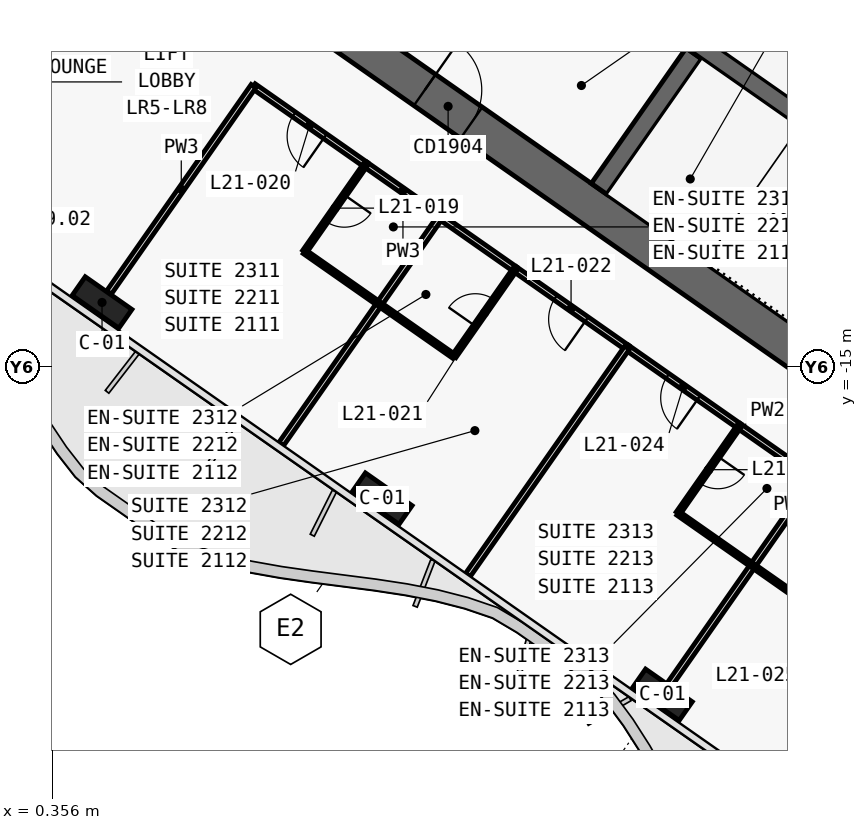
"""IFC4 building model, lengths in metres.
Left out: names, types, materials, properties, quantities, classifications, styles, units other than length and angle.
Written with IfcOpenShell. Run it as: python <this file> out.ifc"""

import sys

from ifc_helpers import new_model, si_unit, direction, frame, frame_2d, origin, origin_2d, place, context, subcontext, project, spatial, polyline, rectangle, outline, extrude, element, fill, save


model = new_model("IFC4")
c1 = context("Model", 3, precision=1e-05, world=origin(), true_north=direction((0.0, 1.0)))
c2 = subcontext(c1, "Body", "Model", "MODEL_VIEW")
j1 = project(units=[si_unit("LENGTHUNIT", "METRE"), si_unit("PLANEANGLEUNIT", "RADIAN")], contexts=[c1])
p1 = place(None, origin())
s1 = spatial("IfcSite", under=j1, at=p1, CompositionType="ELEMENT")
p2 = place(p1, origin())
s2 = spatial("IfcBuilding", under=s1, at=p2, CompositionType="ELEMENT")
p3 = place(p2, frame((0.0, 0.0, 101.3)))
s3 = spatial("IfcBuildingStorey", under=s2, at=p3, CompositionType="ELEMENT", Elevation=101.3)
p4 = place(p3, frame((-0.037, 11.867, 0.0), z_axis=(0.0, 0.0, 1.0), x_axis=(0.819155306259, -0.573571777746, 0.0)))
e1 = element("IfcWall", 1, at=p4, inside=s3, PredefinedType="SHEAR", context=c2, shape_type="SweptSolid", body=[
    extrude(outline(polyline([(33.837, 0.5), (0.0, 0.5), (0.7, -0.5), (33.837, -0.5), (33.837, 0.5)])), origin(), (0.0, 0.0, 1.0), 3.6),
])
p5 = place(p3, frame((-0.037, -0.585, 0.0), z_axis=(0.0, 0.0, 1.0), x_axis=(0.819157152511, -0.573569140985, 0.0)))
e2 = element("IfcWall", 2, at=p5, inside=s3, PredefinedType="SHEAR", context=c2, shape_type="SweptSolid", body=[
    extrude(outline(polyline([(26.695, 0.5), (0.0, 0.5), (0.7, -0.5), (26.695, -0.5), (26.695, 0.5)])), origin(), (0.0, 0.0, 1.0), 3.6),
])
p6 = place(p5, frame((1.045, 0.0, 0.0)))
e3 = element("IfcOpeningElement", 3, at=p6, cuts=e2, PredefinedType="OPENING", context=c2, shape_type="SweptSolid", body=[
    extrude(rectangle(XDim=1.5, YDim=2.1, at=frame_2d((0.75, 1.05))), frame((0.0, 0.51, 0.0), z_axis=(0.0, -1.0, 0.0), x_axis=(1.0, 0.0, 0.0)), (0.0, 0.0, 1.0), 1.02),
])
p7 = place(p5, frame((12.445, 0.0, 0.0)))
e4 = element("IfcOpeningElement", 4, at=p7, cuts=e2, PredefinedType="OPENING", context=c2, shape_type="SweptSolid", body=[
    extrude(rectangle(XDim=1.5, YDim=2.1, at=frame_2d((0.75, 1.05))), frame((0.0, 0.51, 0.0), z_axis=(0.0, -1.0, 0.0), x_axis=(1.0, 0.0, 0.0)), (0.0, 0.0, 1.0), 1.02),
])
p8 = place(p3, frame((14.745, -10.324, 0.0), z_axis=(0.0, 0.0, 1.0), x_axis=(0.57356780395, 0.819158088694, 0.0)))
e5 = element("IfcWall", 5, at=p8, inside=s3, PredefinedType="SHEAR", context=c2, shape_type="SweptSolid", body=[
    extrude(outline(polyline([(0.0, 0.25), (0.0, -0.25), (4.35, -0.25), (4.35, 0.25), (0.0, 0.25)])), origin(), (0.0, 0.0, 1.0), 3.6),
])
p9 = place(p3, frame((2.638, 3.768, 0.0), z_axis=(0.0, 0.0, 1.0), x_axis=(0.819148977158, -0.573580816643, 0.0)))
e6 = element("IfcWall", 6, at=p9, inside=s3, PredefinedType="SHEAR", context=c2, shape_type="SweptSolid", body=[
    extrude(outline(polyline([(0.0, 0.25), (0.0, -0.25), (26.0, -0.25), (26.0, 0.25), (0.0, 0.25)])), origin(), (0.0, 0.0, 1.0), 3.6),
])
p10 = place(p9, frame((9.637, 0.0, 0.0)))
e7 = element("IfcOpeningElement", 7, at=p10, cuts=e6, PredefinedType="OPENING", context=c2, shape_type="SweptSolid", body=[
    extrude(rectangle(XDim=1.2, YDim=2.1, at=frame_2d((0.6, 1.05))), frame((0.0, 0.26, 0.0), z_axis=(0.0, -1.0, 0.0), x_axis=(1.0, 0.0, 0.0)), (0.0, 0.0, 1.0), 0.52),
])
p11 = place(p9, frame((11.812, 0.0, 0.0)))
e8 = element("IfcOpeningElement", 8, at=p11, cuts=e6, PredefinedType="OPENING", context=c2, shape_type="SweptSolid", body=[
    extrude(rectangle(XDim=1.2, YDim=2.1, at=frame_2d((0.6, 1.05))), frame((0.0, 0.26, 0.0), z_axis=(0.0, -1.0, 0.0), x_axis=(1.0, 0.0, 0.0)), (0.0, 0.0, 1.0), 0.52),
])
p12 = place(p9, frame((13.988, 0.0, 0.0)))
e9 = element("IfcOpeningElement", 9, at=p12, cuts=e6, PredefinedType="OPENING", context=c2, shape_type="SweptSolid", body=[
    extrude(rectangle(XDim=1.2, YDim=2.1, at=frame_2d((0.6, 1.05))), frame((0.0, 0.26, 0.0), z_axis=(0.0, -1.0, 0.0), x_axis=(1.0, 0.0, 0.0)), (0.0, 0.0, 1.0), 0.52),
])
p13 = place(p9, frame((16.262, 0.0, 0.0)))
e10 = element("IfcOpeningElement", 10, at=p13, cuts=e6, PredefinedType="OPENING", context=c2, shape_type="SweptSolid", body=[
    extrude(rectangle(XDim=1.0, YDim=2.1, at=frame_2d((0.5, 1.05))), frame((0.0, 0.26, 0.0), z_axis=(0.0, -1.0, 0.0), x_axis=(1.0, 0.0, 0.0)), (0.0, 0.0, 1.0), 0.52),
])
for number, where, z_axis, x_axis in (
    (11, (1.665, -13.313, 0.0), (0.0, 0.0, 1.0), (0.819, -0.574, 0.0)),
    (12, (9.038, -18.475, 0.0), (0.0, 0.0, 1.0), (0.819, -0.574, 0.0)),
    (13, (16.41, -23.637, 0.0), (0.0, 0.0, 1.0), (0.819, -0.574, 0.0)),
):
    element("IfcColumn", number, at=place(p3, frame(where, z_axis=z_axis, x_axis=x_axis)), inside=s3, PredefinedType="COLUMN", context=c2, shape_type="SweptSolid", body=[
        extrude(rectangle(XDim=1.5, YDim=0.6, at=origin_2d()), origin(), (0.0, 0.0, 1.0), 3.6),
    ])
p14 = place(p3, frame((8.601, -9.685, 0.0), z_axis=(0.0, 0.0, 1.0), x_axis=(-0.819149096931, 0.573580645591, 0.0)))
e14 = element("IfcWall", 14, at=p14, inside=s3, PredefinedType="PARTITIONING", context=c2, shape_type="SweptSolid", body=[
    extrude(rectangle(XDim=3.601, YDim=0.15, at=frame_2d((1.8, 0.0))), origin(), (0.0, 0.0, 1.0), 2.6),
])
p15 = place(p14, frame((1.301, 0.0, 0.0)))
e15 = element("IfcOpeningElement", 15, at=p15, cuts=e14, PredefinedType="OPENING", context=c2, shape_type="SweptSolid", body=[
    extrude(rectangle(XDim=1.0, YDim=2.1, at=frame_2d((0.5, 1.05))), frame((0.0, 0.085, 0.0), z_axis=(0.0, -1.0, 0.0), x_axis=(1.0, 0.0, 0.0)), (0.0, 0.0, 1.0), 0.17),
])
p16 = place(p3, frame((10.568, -11.062, 0.0), z_axis=(0.0, 0.0, 1.0), x_axis=(-0.819146032251, 0.573585022335, 0.0)))
e16 = element("IfcWall", 16, at=p16, inside=s3, PredefinedType="PARTITIONING", context=c2, shape_type="SweptSolid", body=[
    extrude(rectangle(XDim=2.404, YDim=0.15, at=frame_2d((1.202, 0.0))), origin(), (0.0, 0.0, 1.0), 3.32),
])
p17 = place(p3, frame((15.483, -14.504, 0.0), z_axis=(0.0, 0.0, 1.0), x_axis=(-0.819145961204, 0.573585123798, 0.0)))
e17 = element("IfcWall", 17, at=p17, inside=s3, PredefinedType="PARTITIONING", context=c2, shape_type="SweptSolid", body=[
    extrude(rectangle(XDim=3.603, YDim=0.15, at=frame_2d((1.802, 0.0))), origin(), (0.0, 0.0, 1.0), 2.6),
])
p18 = place(p17, frame((1.302, 0.0, 0.0)))
e18 = element("IfcOpeningElement", 18, at=p18, cuts=e17, PredefinedType="OPENING", context=c2, shape_type="SweptSolid", body=[
    extrude(rectangle(XDim=1.0, YDim=2.1, at=frame_2d((0.5, 1.05))), frame((0.0, 0.085, 0.0), z_axis=(0.0, -1.0, 0.0), x_axis=(1.0, 0.0, 0.0)), (0.0, 0.0, 1.0), 0.17),
])
p19 = place(p3, frame((12.534, -12.439, 0.0), z_axis=(0.0, 0.0, 1.0), x_axis=(-0.819193748, 0.57351687267, 0.0)))
e19 = element("IfcWall", 19, at=p19, inside=s3, PredefinedType="PARTITIONING", context=c2, shape_type="SweptSolid", body=[
    extrude(rectangle(XDim=2.404, YDim=0.15, at=frame_2d((1.202, 0.0))), origin(), (0.0, 0.0, 1.0), 3.32),
])
p20 = place(p3, frame((18.431, -16.568, 0.0), z_axis=(0.0, 0.0, 1.0), x_axis=(-0.819145961204, 0.573585123798, 0.0)))
e20 = element("IfcWall", 20, at=p20, inside=s3, PredefinedType="PARTITIONING", context=c2, shape_type="SweptSolid", body=[
    extrude(rectangle(XDim=3.603, YDim=0.15, at=frame_2d((1.802, 0.0))), origin(), (0.0, 0.0, 1.0), 3.32),
])
p21 = place(p20, frame((1.301, 0.0, 0.0)))
e21 = element("IfcOpeningElement", 21, at=p21, cuts=e20, PredefinedType="OPENING", context=c2, shape_type="SweptSolid", body=[
    extrude(rectangle(XDim=1.0, YDim=2.1, at=frame_2d((0.5, 1.05))), frame((0.0, 0.085, 0.0), z_axis=(0.0, -1.0, 0.0), x_axis=(1.0, 0.0, 0.0)), (0.0, 0.0, 1.0), 0.17),
])
p22 = place(p3, frame((20.398, -17.945, 0.0), z_axis=(0.0, 0.0, 1.0), x_axis=(-0.819146032251, 0.573585022335, 0.0)))
e22 = element("IfcWall", 22, at=p22, inside=s3, PredefinedType="PARTITIONING", context=c2, shape_type="SweptSolid", body=[
    extrude(rectangle(XDim=2.404, YDim=0.15, at=frame_2d((1.202, 0.0))), origin(), (0.0, 0.0, 1.0), 2.6),
])
p23 = place(p3, frame((8.6, -9.684, 0.0), z_axis=(0.0, 0.0, 1.0), x_axis=(-0.573550118428, -0.819170471667, 0.0)))
e23 = element("IfcWall", 23, at=p23, inside=s3, PredefinedType="PARTITIONING", context=c2, shape_type="SweptSolid", body=[
    extrude(rectangle(XDim=2.8, YDim=0.12, at=frame_2d((1.4, 0.0))), origin(), (0.0, 0.0, 1.0), 3.32),
])
p24 = place(p23, frame((0.975, 0.0, 0.0)))
e24 = element("IfcOpeningElement", 24, at=p24, cuts=e23, PredefinedType="OPENING", context=c2, shape_type="SweptSolid", body=[
    extrude(rectangle(XDim=0.85, YDim=2.05, at=frame_2d((0.425, 1.025))), frame((0.0, 0.07, 0.0), z_axis=(0.0, -1.0, 0.0), x_axis=(1.0, 0.0, 0.0)), (0.0, 0.0, 1.0), 0.14),
])
p25 = place(p3, frame((6.994, -11.979, 0.0), z_axis=(0.0, 0.0, 1.0), x_axis=(0.819188907105, -0.573523787192, 0.0)))
e25 = element("IfcWall", 25, at=p25, inside=s3, PredefinedType="PARTITIONING", context=c2, shape_type="SweptSolid", body=[
    extrude(rectangle(XDim=2.4, YDim=0.12, at=frame_2d((1.2, 0.0))), origin(), (0.0, 0.0, 1.0), 3.32),
])
p26 = place(p3, frame((8.96, -13.355, 0.0), z_axis=(0.0, 0.0, 1.0), x_axis=(-0.573564311442, -0.819160534108, 0.0)))
e26 = element("IfcWall", 26, at=p26, inside=s3, PredefinedType="PARTITIONING", context=c2, shape_type="SweptSolid", body=[
    extrude(rectangle(XDim=4.499, YDim=0.15, at=frame_2d((2.25, 0.0))), origin(), (0.0, 0.0, 1.0), 2.5),
])
p27 = place(p3, frame((1.849, -13.051, 0.0), z_axis=(0.0, 0.0, 1.0), x_axis=(0.57357355307, 0.819154063177, 0.0)))
e27 = element("IfcWall", 27, at=p27, inside=s3, PredefinedType="PARTITIONING", context=c2, shape_type="SweptSolid", body=[
    extrude(rectangle(XDim=6.63, YDim=0.15, at=frame_2d((3.315, 0.0))), origin(), (0.0, 0.0, 1.0), 2.6),
])
p28 = place(p3, frame((10.567, -11.061, 0.0), z_axis=(0.0, 0.0, 1.0), x_axis=(-0.573608623498, -0.819129505664, 0.0)))
e28 = element("IfcWall", 28, at=p28, inside=s3, PredefinedType="PARTITIONING", context=c2, shape_type="SweptSolid", body=[
    extrude(rectangle(XDim=2.8, YDim=0.15, at=frame_2d((1.4, 0.0))), origin(), (0.0, 0.0, 1.0), 3.32),
])
p29 = place(p3, frame((8.96, -13.355, 0.0), z_axis=(0.0, 0.0, 1.0), x_axis=(0.819107643868, -0.573639841501, 0.0)))
e29 = element("IfcWall", 29, at=p29, inside=s3, PredefinedType="PARTITIONING", context=c2, shape_type="SweptSolid", body=[
    extrude(rectangle(XDim=2.4, YDim=0.12, at=frame_2d((1.2, 0.0))), origin(), (0.0, 0.0, 1.0), 3.32),
])
p30 = place(p3, frame((10.927, -14.732, 0.0), z_axis=(0.0, 0.0, 1.0), x_axis=(0.573550118428, 0.819170471667, 0.0)))
e30 = element("IfcWall", 30, at=p30, inside=s3, PredefinedType="PARTITIONING", context=c2, shape_type="SweptSolid", body=[
    extrude(rectangle(XDim=2.8, YDim=0.12, at=frame_2d((1.4, 0.0))), origin(), (0.0, 0.0, 1.0), 3.32),
])
p31 = place(p30, frame((0.975, 0.0, 0.0)))
e31 = element("IfcOpeningElement", 31, at=p31, cuts=e30, PredefinedType="OPENING", context=c2, shape_type="SweptSolid", body=[
    extrude(rectangle(XDim=0.85, YDim=2.05, at=frame_2d((0.425, 1.025))), frame((0.0, 0.07, 0.0), z_axis=(0.0, -1.0, 0.0), x_axis=(1.0, 0.0, 0.0)), (0.0, 0.0, 1.0), 0.14),
])
p32 = place(p3, frame((15.481, -14.503, 0.0), z_axis=(0.0, 0.0, 1.0), x_axis=(-0.573572324301, -0.819154923562, 0.0)))
e32 = element("IfcWall", 32, at=p32, inside=s3, PredefinedType="PARTITIONING", context=c2, shape_type="SweptSolid", body=[
    extrude(rectangle(XDim=7.3, YDim=0.15, at=frame_2d((3.65, 0.0))), origin(), (0.0, 0.0, 1.0), 2.5),
])
p33 = place(p3, frame((18.43, -16.567, 0.0), z_axis=(0.0, 0.0, 1.0), x_axis=(-0.573608623498, -0.819129505664, 0.0)))
e33 = element("IfcWall", 33, at=p33, inside=s3, PredefinedType="PARTITIONING", context=c2, shape_type="SweptSolid", body=[
    extrude(rectangle(XDim=2.8, YDim=0.12, at=frame_2d((1.4, 0.0))), origin(), (0.0, 0.0, 1.0), 3.32),
])
p34 = place(p33, frame((0.975, 0.0, 0.0)))
e34 = element("IfcOpeningElement", 34, at=p34, cuts=e33, PredefinedType="OPENING", context=c2, shape_type="SweptSolid", body=[
    extrude(rectangle(XDim=0.85, YDim=2.05, at=frame_2d((0.425, 1.025))), frame((0.0, 0.07, 0.0), z_axis=(0.0, -1.0, 0.0), x_axis=(1.0, 0.0, 0.0)), (0.0, 0.0, 1.0), 0.14),
])
p35 = place(p3, frame((16.824, -18.862, 0.0), z_axis=(0.0, 0.0, 1.0), x_axis=(0.819141114317, -0.573592045652, 0.0)))
e35 = element("IfcWall", 35, at=p35, inside=s3, PredefinedType="PARTITIONING", context=c2, shape_type="SweptSolid", body=[
    extrude(rectangle(XDim=2.4, YDim=0.12, at=frame_2d((1.2, 0.0))), origin(), (0.0, 0.0, 1.0), 2.6),
])
p36 = place(p3, frame((18.79, -20.239, 0.0), z_axis=(0.0, 0.0, 1.0), x_axis=(-0.573594994199, -0.819139049631, 0.0)))
e36 = element("IfcWall", 36, at=p36, inside=s3, PredefinedType="PARTITIONING", context=c2, shape_type="SweptSolid", body=[
    extrude(rectangle(XDim=3.829, YDim=0.15, at=frame_2d((1.915, 0.0))), origin(), (0.0, 0.0, 1.0), 2.6),
])
p37 = place(p3, frame((20.396, -17.944, 0.0), z_axis=(0.0, 0.0, 1.0), x_axis=(-0.57364959175, -0.819100815459, 0.0)))
e37 = element("IfcWall", 37, at=p37, inside=s3, PredefinedType="PARTITIONING", context=c2, shape_type="SweptSolid", body=[
    extrude(rectangle(XDim=2.8, YDim=0.15, at=frame_2d((1.4, 0.0))), origin(), (0.0, 0.0, 1.0), 2.6),
])
p38 = place(p3, frame((18.79, -20.239, 0.0), z_axis=(0.0, 0.0, 1.0), x_axis=(0.819188907105, -0.573523787192, 0.0)))
e38 = element("IfcWall", 38, at=p38, inside=s3, PredefinedType="PARTITIONING", context=c2, shape_type="SweptSolid", body=[
    extrude(rectangle(XDim=2.4, YDim=0.12, at=frame_2d((1.2, 0.0))), origin(), (0.0, 0.0, 1.0), 2.6),
])
p39 = place(p7, origin())
e39 = element("IfcDoor", 39, at=p39, inside=s3, OperationType="DOUBLE_DOOR_SINGLE_SWING", PredefinedType="DOOR", context=c2, shape_type="SweptSolid", body=[
    extrude(rectangle(XDim=1.5, YDim=2.1, at=frame_2d((0.75, 1.05))), frame((0.0, 0.025, 0.0), z_axis=(0.0, -1.0, 0.0), x_axis=(1.0, 0.0, 0.0)), (0.0, 0.0, 1.0), 0.05),
])
fill(e4, e39)
p40 = place(p24, origin())
e40 = element("IfcDoor", 40, at=p40, inside=s3, OperationType="SINGLE_SWING_LEFT", PredefinedType="DOOR", context=c2, shape_type="SweptSolid", body=[
    extrude(rectangle(XDim=0.85, YDim=2.05, at=frame_2d((0.425, 1.025))), frame((0.0, 0.025, 0.0), z_axis=(0.0, -1.0, 0.0), x_axis=(1.0, 0.0, 0.0)), (0.0, 0.0, 1.0), 0.05),
])
fill(e24, e40)
p41 = place(p15, origin())
e41 = element("IfcDoor", 41, at=p41, inside=s3, OperationType="SINGLE_SWING_RIGHT", PredefinedType="DOOR", context=c2, shape_type="SweptSolid", body=[
    extrude(rectangle(XDim=1.0, YDim=2.1, at=frame_2d((0.5, 1.05))), frame((0.0, 0.025, 0.0), z_axis=(0.0, -1.0, 0.0), x_axis=(1.0, 0.0, 0.0)), (0.0, 0.0, 1.0), 0.05),
])
fill(e15, e41)
p42 = place(p31, origin())
e42 = element("IfcDoor", 42, at=p42, inside=s3, OperationType="SINGLE_SWING_LEFT", PredefinedType="DOOR", context=c2, shape_type="SweptSolid", body=[
    extrude(rectangle(XDim=0.85, YDim=2.05, at=frame_2d((0.425, 1.025))), frame((0.0, 0.025, 0.0), z_axis=(0.0, -1.0, 0.0), x_axis=(1.0, 0.0, 0.0)), (0.0, 0.0, 1.0), 0.05),
])
fill(e31, e42)
p43 = place(p18, origin())
e43 = element("IfcDoor", 43, at=p43, inside=s3, OperationType="SINGLE_SWING_RIGHT", PredefinedType="DOOR", context=c2, shape_type="SweptSolid", body=[
    extrude(rectangle(XDim=1.0, YDim=2.1, at=frame_2d((0.5, 1.05))), frame((0.0, 0.025, 0.0), z_axis=(0.0, -1.0, 0.0), x_axis=(1.0, 0.0, 0.0)), (0.0, 0.0, 1.0), 0.05),
])
fill(e18, e43)
p44 = place(p34, origin())
e44 = element("IfcDoor", 44, at=p44, inside=s3, OperationType="SINGLE_SWING_LEFT", PredefinedType="DOOR", context=c2, shape_type="SweptSolid", body=[
    extrude(rectangle(XDim=0.85, YDim=2.05, at=frame_2d((0.425, 1.025))), frame((0.0, 0.025, 0.0), z_axis=(0.0, -1.0, 0.0), x_axis=(1.0, 0.0, 0.0)), (0.0, 0.0, 1.0), 0.05),
])
fill(e34, e44)
p45 = place(p21, origin())
e45 = element("IfcDoor", 45, at=p45, inside=s3, OperationType="SINGLE_SWING_RIGHT", PredefinedType="DOOR", context=c2, shape_type="SweptSolid", body=[
    extrude(rectangle(XDim=1.0, YDim=2.1, at=frame_2d((0.5, 1.05))), frame((0.0, 0.025, 0.0), z_axis=(0.0, -1.0, 0.0), x_axis=(1.0, 0.0, 0.0)), (0.0, 0.0, 1.0), 0.05),
])
fill(e21, e45)
save(model, sys.argv[1])
